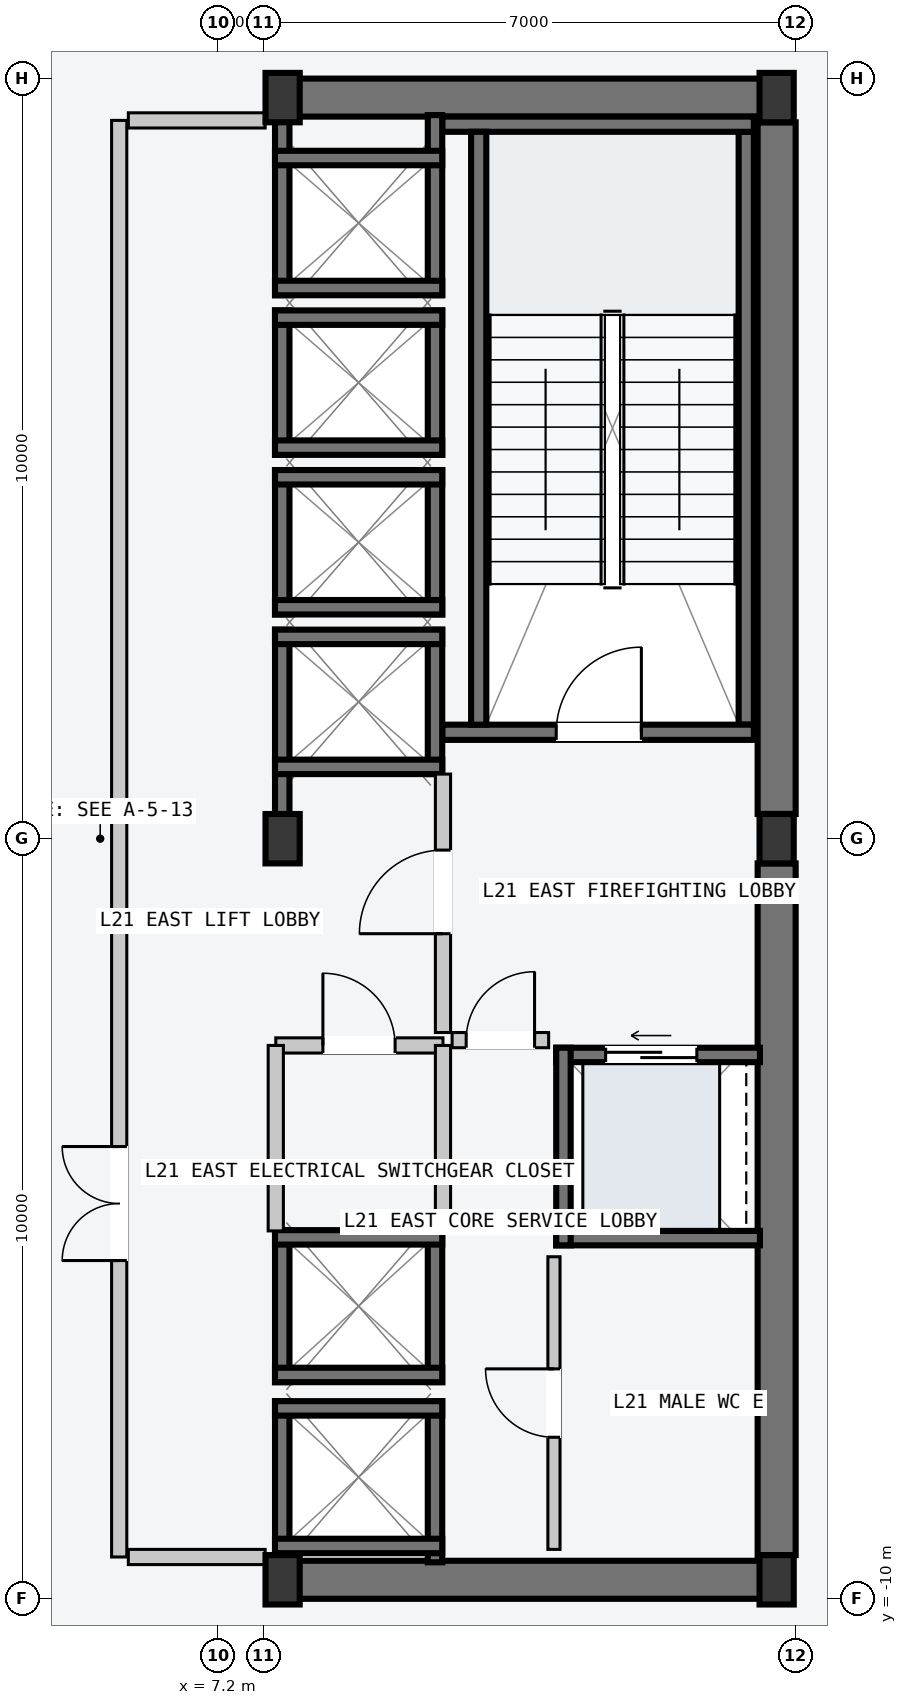
"""IFC4 building model, lengths in metres.
Left out: names, types, materials, properties, quantities, classifications, styles, units other than length and angle.
Written with IfcOpenShell. Run it as: python <this file> out.ifc"""

import sys

from ifc_helpers import new_model, si_unit, direction, frame, frame_2d, origin, origin_2d, place, context, subcontext, project, spatial, rectangle, i_section, extrude, element, fill, save


model = new_model("IFC4")
c1 = context("Model", 3, precision=1e-05, world=origin(), true_north=direction((0.0, 1.0)))
c2 = subcontext(c1, "Body", "Model", "MODEL_VIEW")
j1 = project(units=[si_unit("LENGTHUNIT", "METRE"), si_unit("PLANEANGLEUNIT", "RADIAN")], contexts=[c1])
p1 = place(None, origin())
s1 = spatial("IfcSite", under=j1, at=p1, CompositionType="ELEMENT")
p2 = place(p1, origin())
s2 = spatial("IfcBuilding", under=s1, at=p2, CompositionType="ELEMENT")
p3 = place(p2, frame((0.0, 0.0, 82.8)))
s3 = spatial("IfcBuildingStorey", under=s2, at=p3, CompositionType="ELEMENT", Elevation=82.8)
for number, where, z_axis, x_axis in (
    (1, (8.07, -9.75, -0.2), (0.0, 0.0, 1.0), (1.0, 0.0, 0.0)),
    (2, (8.07, 9.75, -0.2), (0.0, 0.0, 1.0), (1.0, 0.0, 0.0)),
):
    element("IfcWall", number, at=place(p3, frame(where, z_axis=z_axis, x_axis=x_axis)), inside=s3, PredefinedType="SHEAR", context=c2, shape_type="SweptSolid", body=[
        extrude(rectangle(XDim=6.46, YDim=0.5, at=frame_2d((3.23, 0.0))), origin(), (0.0, 0.0, 1.0), 4.5),
    ])
for number, where, z_axis, x_axis in (
    (3, (14.55, -9.425, -0.2), (0.0, 0.0, 1.0), (0.0, 1.0, 0.0)),
    (4, (14.55, 0.325, -0.2), (0.0, 0.0, 1.0), (0.0, 1.0, 0.0)),
):
    element("IfcWall", number, at=place(p3, frame(where, z_axis=z_axis, x_axis=x_axis)), inside=s3, PredefinedType="SHEAR", context=c2, shape_type="SweptSolid", body=[
        extrude(rectangle(XDim=9.1, YDim=0.5, at=frame_2d((4.55, 0.0))), origin(), (0.0, 0.0, 1.0), 4.5),
    ])
p4 = place(p3, frame((14.15, 1.5, -0.2), z_axis=(0.0, 0.0, 1.0), x_axis=(0.0, 1.0, 0.0)))
e5 = element("IfcWall", 5, at=p4, inside=s3, PredefinedType="SOLIDWALL", context=c2, shape_type="SweptSolid", body=[
    extrude(rectangle(XDim=7.8, YDim=0.2, at=frame_2d((3.9, 0.0))), origin(), (0.0, 0.0, 1.0), 4.5),
])
p5 = place(p3, frame((10.15, 1.4, -0.2), z_axis=(0.0, 0.0, 1.0), x_axis=(1.0, 0.0, 0.0)))
e6 = element("IfcWall", 6, at=p5, inside=s3, PredefinedType="SOLIDWALL", context=c2, shape_type="SweptSolid", body=[
    extrude(rectangle(XDim=4.1, YDim=0.2, at=frame_2d((2.05, 0.0))), origin(), (0.0, 0.0, 1.0), 4.5),
])
p6 = place(p5, frame((1.5, 0.0, 0.2)))
e7 = element("IfcOpeningElement", 7, at=p6, cuts=e6, PredefinedType="OPENING", context=c2, shape_type="SweptSolid", body=[
    extrude(rectangle(XDim=1.12, YDim=2.18, at=frame_2d((0.56, 1.09))), frame((0.0, 0.11, 0.0), z_axis=(0.0, -1.0, 0.0), x_axis=(1.0, 0.0, 0.0)), (0.0, 0.0, 1.0), 0.22),
])
p7 = place(p3, frame((10.15, 9.4, -0.2), z_axis=(0.0, 0.0, 1.0), x_axis=(1.0, 0.0, 0.0)))
e8 = element("IfcWall", 8, at=p7, inside=s3, PredefinedType="SOLIDWALL", context=c2, shape_type="SweptSolid", body=[
    extrude(rectangle(XDim=4.1, YDim=0.2, at=frame_2d((2.05, 0.0))), origin(), (0.0, 0.0, 1.0), 4.5),
])
p8 = place(p3, frame((10.63, 1.5, -0.2), z_axis=(0.0, 0.0, 1.0), x_axis=(0.0, 1.0, 0.0)))
e9 = element("IfcWall", 9, at=p8, inside=s3, PredefinedType="SOLIDWALL", context=c2, shape_type="SweptSolid", body=[
    extrude(rectangle(XDim=7.8, YDim=0.2, at=frame_2d((3.9, 0.0))), origin(), (0.0, 0.0, 1.0), 4.5),
])
for number, where, z_axis, x_axis in (
    (10, (8.05, -9.75, 0.0), (0.0, 0.0, 1.0), (1.0, 0.0, 0.0)),
    (11, (8.05, 0.0, 0.0), (0.0, 0.0, 1.0), (1.0, 0.0, 0.0)),
    (12, (8.05, 9.75, 0.0), (0.0, 0.0, 1.0), (1.0, 0.0, 0.0)),
    (13, (14.55, -9.75, 0.0), (0.0, 0.0, 1.0), (1.0, 0.0, 0.0)),
    (14, (14.55, 0.0, 0.0), (0.0, 0.0, 1.0), (1.0, 0.0, 0.0)),
    (15, (14.55, 9.75, 0.0), (0.0, 0.0, 1.0), (1.0, 0.0, 0.0)),
):
    element("IfcColumn", number, at=place(p3, frame(where, z_axis=z_axis, x_axis=x_axis)), inside=s3, PredefinedType="COLUMN", context=c2, shape_type="SweptSolid", body=[
        extrude(i_section(OverallWidth=0.45, OverallDepth=0.65, WebThickness=0.025, FlangeThickness=0.04, at=origin_2d()), origin(), (0.0, 0.0, 1.0), 4.5),
    ])
p9 = place(p3, frame((8.045, 0.21, -0.2), z_axis=(0.0, 0.0, 1.0), x_axis=(0.0, 1.0, 0.0)))
e16 = element("IfcWall", 16, at=p9, inside=s3, PredefinedType="SOLIDWALL", context=c2, shape_type="SweptSolid", body=[
    extrude(rectangle(XDim=2.54, YDim=0.19, at=frame_2d((1.27, 0.0))), origin(), (0.0, 0.0, 1.0), 4.5),
])
p10 = place(p3, frame((10.055, 0.85, -0.2), z_axis=(0.0, 0.0, 1.0), x_axis=(0.0, 1.0, 0.0)))
e17 = element("IfcWall", 17, at=p10, inside=s3, PredefinedType="SOLIDWALL", context=c2, shape_type="SweptSolid", body=[
    extrude(rectangle(XDim=1.9, YDim=0.19, at=frame_2d((0.95, 0.0))), origin(), (0.0, 0.0, 1.0), 4.5),
])
for number, where, z_axis, x_axis in (
    (18, (7.95, 2.655, -0.2), (0.0, 0.0, 1.0), (1.0, 0.0, 0.0)),
    (19, (7.95, 0.945, -0.2), (0.0, 0.0, 1.0), (1.0, 0.0, 0.0)),
):
    element("IfcWall", number, at=place(p3, frame(where, z_axis=z_axis, x_axis=x_axis)), inside=s3, PredefinedType="SOLIDWALL", context=c2, shape_type="SweptSolid", body=[
        extrude(rectangle(XDim=2.2, YDim=0.19, at=frame_2d((1.1, 0.0))), origin(), (0.0, 0.0, 1.0), 4.5),
    ])
for number, where, z_axis, x_axis in (
    (20, (8.045, 2.95, -0.2), (0.0, 0.0, 1.0), (0.0, 1.0, 0.0)),
    (21, (10.055, 2.95, -0.2), (0.0, 0.0, 1.0), (0.0, 1.0, 0.0)),
):
    element("IfcWall", number, at=place(p3, frame(where, z_axis=z_axis, x_axis=x_axis)), inside=s3, PredefinedType="SOLIDWALL", context=c2, shape_type="SweptSolid", body=[
        extrude(rectangle(XDim=1.9, YDim=0.19, at=frame_2d((0.95, 0.0))), origin(), (0.0, 0.0, 1.0), 4.5),
    ])
for number, where, z_axis, x_axis in (
    (22, (7.95, 4.755, -0.2), (0.0, 0.0, 1.0), (1.0, 0.0, 0.0)),
    (23, (7.95, 3.045, -0.2), (0.0, 0.0, 1.0), (1.0, 0.0, 0.0)),
):
    element("IfcWall", number, at=place(p3, frame(where, z_axis=z_axis, x_axis=x_axis)), inside=s3, PredefinedType="SOLIDWALL", context=c2, shape_type="SweptSolid", body=[
        extrude(rectangle(XDim=2.2, YDim=0.19, at=frame_2d((1.1, 0.0))), origin(), (0.0, 0.0, 1.0), 4.5),
    ])
for number, where, z_axis, x_axis in (
    (24, (8.045, 5.05, -0.2), (0.0, 0.0, 1.0), (0.0, 1.0, 0.0)),
    (25, (10.055, 5.05, -0.2), (0.0, 0.0, 1.0), (0.0, 1.0, 0.0)),
):
    element("IfcWall", number, at=place(p3, frame(where, z_axis=z_axis, x_axis=x_axis)), inside=s3, PredefinedType="SOLIDWALL", context=c2, shape_type="SweptSolid", body=[
        extrude(rectangle(XDim=1.9, YDim=0.19, at=frame_2d((0.95, 0.0))), origin(), (0.0, 0.0, 1.0), 4.5),
    ])
for number, where, z_axis, x_axis in (
    (26, (7.95, 6.855, -0.2), (0.0, 0.0, 1.0), (1.0, 0.0, 0.0)),
    (27, (7.95, 5.145, -0.2), (0.0, 0.0, 1.0), (1.0, 0.0, 0.0)),
):
    element("IfcWall", number, at=place(p3, frame(where, z_axis=z_axis, x_axis=x_axis)), inside=s3, PredefinedType="SOLIDWALL", context=c2, shape_type="SweptSolid", body=[
        extrude(rectangle(XDim=2.2, YDim=0.19, at=frame_2d((1.1, 0.0))), origin(), (0.0, 0.0, 1.0), 4.5),
    ])
for number, where, z_axis, x_axis in (
    (28, (8.045, 7.15, -0.2), (0.0, 0.0, 1.0), (0.0, 1.0, 0.0)),
    (29, (10.055, 7.15, -0.2), (0.0, 0.0, 1.0), (0.0, 1.0, 0.0)),
):
    element("IfcWall", number, at=place(p3, frame(where, z_axis=z_axis, x_axis=x_axis)), inside=s3, PredefinedType="SOLIDWALL", context=c2, shape_type="SweptSolid", body=[
        extrude(rectangle(XDim=2.37, YDim=0.19, at=frame_2d((1.185, 0.0))), origin(), (0.0, 0.0, 1.0), 4.5),
    ])
for number, where, z_axis, x_axis in (
    (30, (7.95, 8.955, -0.2), (0.0, 0.0, 1.0), (1.0, 0.0, 0.0)),
    (31, (7.95, 7.245, -0.2), (0.0, 0.0, 1.0), (1.0, 0.0, 0.0)),
):
    element("IfcWall", number, at=place(p3, frame(where, z_axis=z_axis, x_axis=x_axis)), inside=s3, PredefinedType="SOLIDWALL", context=c2, shape_type="SweptSolid", body=[
        extrude(rectangle(XDim=2.2, YDim=0.19, at=frame_2d((1.1, 0.0))), origin(), (0.0, 0.0, 1.0), 4.5),
    ])
for number, where, z_axis, x_axis in (
    (32, (8.045, -9.52, -0.2), (0.0, 0.0, 1.0), (0.0, 1.0, 0.0)),
    (33, (10.055, -9.52, -0.2), (0.0, 0.0, 1.0), (0.0, 1.0, 0.0)),
):
    element("IfcWall", number, at=place(p3, frame(where, z_axis=z_axis, x_axis=x_axis)), inside=s3, PredefinedType="SOLIDWALL", context=c2, shape_type="SweptSolid", body=[
        extrude(rectangle(XDim=2.12, YDim=0.19, at=frame_2d((1.06, 0.0))), origin(), (0.0, 0.0, 1.0), 4.5),
    ])
for number, where, z_axis, x_axis in (
    (34, (7.95, -7.495, -0.2), (0.0, 0.0, 1.0), (1.0, 0.0, 0.0)),
    (35, (7.95, -9.305, -0.2), (0.0, 0.0, 1.0), (1.0, 0.0, 0.0)),
):
    element("IfcWall", number, at=place(p3, frame(where, z_axis=z_axis, x_axis=x_axis)), inside=s3, PredefinedType="SOLIDWALL", context=c2, shape_type="SweptSolid", body=[
        extrude(rectangle(XDim=2.2, YDim=0.19, at=frame_2d((1.1, 0.0))), origin(), (0.0, 0.0, 1.0), 4.5),
    ])
for number, where, z_axis, x_axis in (
    (36, (8.045, -7.15, -0.2), (0.0, 0.0, 1.0), (0.0, 1.0, 0.0)),
    (37, (10.055, -7.15, -0.2), (0.0, 0.0, 1.0), (0.0, 1.0, 0.0)),
):
    element("IfcWall", number, at=place(p3, frame(where, z_axis=z_axis, x_axis=x_axis)), inside=s3, PredefinedType="SOLIDWALL", context=c2, shape_type="SweptSolid", body=[
        extrude(rectangle(XDim=2.0, YDim=0.19, at=frame_2d((1.0, 0.0))), origin(), (0.0, 0.0, 1.0), 4.5),
    ])
for number, where, z_axis, x_axis in (
    (38, (7.95, -5.245, -0.2), (0.0, 0.0, 1.0), (1.0, 0.0, 0.0)),
    (39, (7.95, -7.055, -0.2), (0.0, 0.0, 1.0), (1.0, 0.0, 0.0)),
):
    element("IfcWall", number, at=place(p3, frame(where, z_axis=z_axis, x_axis=x_axis)), inside=s3, PredefinedType="SOLIDWALL", context=c2, shape_type="SweptSolid", body=[
        extrude(rectangle(XDim=2.2, YDim=0.19, at=frame_2d((1.1, 0.0))), origin(), (0.0, 0.0, 1.0), 4.5),
    ])
p11 = place(p3, frame((11.65, -2.845, -0.2), z_axis=(0.0, 0.0, 1.0), x_axis=(1.0, 0.0, 0.0)))
e40 = element("IfcWall", 40, at=p11, inside=s3, PredefinedType="SOLIDWALL", context=c2, shape_type="SweptSolid", body=[
    extrude(rectangle(XDim=2.68, YDim=0.19, at=frame_2d((1.34, 0.0))), origin(), (0.0, 0.0, 1.0), 4.5),
])
p12 = place(p11, frame((0.65, 0.0, 0.2)))
e41 = element("IfcOpeningElement", 41, at=p12, cuts=e40, PredefinedType="OPENING", context=c2, shape_type="SweptSolid", body=[
    extrude(rectangle(XDim=1.2, YDim=2.2, at=frame_2d((0.6, 1.1))), frame((0.0, 0.105, 0.0), z_axis=(0.0, -1.0, 0.0), x_axis=(1.0, 0.0, 0.0)), (0.0, 0.0, 1.0), 0.21),
])
p13 = place(p3, frame((11.65, -5.255, -0.2), z_axis=(0.0, 0.0, 1.0), x_axis=(1.0, 0.0, 0.0)))
e42 = element("IfcWall", 42, at=p13, inside=s3, PredefinedType="SOLIDWALL", context=c2, shape_type="SweptSolid", body=[
    extrude(rectangle(XDim=2.68, YDim=0.19, at=frame_2d((1.34, 0.0))), origin(), (0.0, 0.0, 1.0), 4.5),
])
p14 = place(p3, frame((11.745, -5.35, -0.2), z_axis=(0.0, 0.0, 1.0), x_axis=(0.0, 1.0, 0.0)))
e43 = element("IfcWall", 43, at=p14, inside=s3, PredefinedType="SOLIDWALL", context=c2, shape_type="SweptSolid", body=[
    extrude(rectangle(XDim=2.6, YDim=0.19, at=frame_2d((1.3, 0.0))), origin(), (0.0, 0.0, 1.0), 4.5),
])
p15 = place(p3, frame((5.9, -9.45, 0.0), z_axis=(0.0, 0.0, 1.0), x_axis=(0.0, 1.0, 0.0)))
e44 = element("IfcWall", 44, at=p15, inside=s3, PredefinedType="PARTITIONING", context=c2, shape_type="SweptSolid", body=[
    extrude(rectangle(XDim=18.9, YDim=0.2, at=frame_2d((9.45, 0.0))), origin(), (0.0, 0.0, 1.0), 4.3),
])
p16 = place(p15, frame((3.9, 0.0, 0.0)))
e45 = element("IfcOpeningElement", 45, at=p16, cuts=e44, PredefinedType="OPENING", context=c2, shape_type="SweptSolid", body=[
    extrude(rectangle(XDim=1.5, YDim=2.2, at=frame_2d((0.75, 1.1))), frame((0.0, 0.11, 0.0), z_axis=(0.0, -1.0, 0.0), x_axis=(1.0, 0.0, 0.0)), (0.0, 0.0, 1.0), 0.22),
])
for number, where, z_axis, x_axis in (
    (46, (6.02, -9.45, 0.0), (0.0, 0.0, 1.0), (1.0, 0.0, 0.0)),
    (47, (6.02, 9.45, 0.0), (0.0, 0.0, 1.0), (1.0, 0.0, 0.0)),
):
    element("IfcWall", number, at=place(p3, frame(where, z_axis=z_axis, x_axis=x_axis)), inside=s3, PredefinedType="PARTITIONING", context=c2, shape_type="SweptSolid", body=[
        extrude(rectangle(XDim=1.8, YDim=0.2, at=frame_2d((0.9, 0.0))), origin(), (0.0, 0.0, 1.0), 2.64),
    ])
p17 = place(p3, frame((10.16, -2.55, 0.0), z_axis=(0.0, 0.0, 1.0), x_axis=(0.0, 1.0, 0.0)))
e48 = element("IfcWall", 48, at=p17, inside=s3, PredefinedType="PARTITIONING", context=c2, shape_type="SweptSolid", body=[
    extrude(rectangle(XDim=3.4, YDim=0.2, at=frame_2d((1.7, 0.0))), origin(), (0.0, 0.0, 1.0), 4.3),
])
p18 = place(p17, frame((1.3, 0.0, 0.0)))
e49 = element("IfcOpeningElement", 49, at=p18, cuts=e48, PredefinedType="OPENING", context=c2, shape_type="SweptSolid", body=[
    extrude(rectangle(XDim=1.1, YDim=2.15, at=frame_2d((0.55, 1.075))), frame((0.0, 0.11, 0.0), z_axis=(0.0, -1.0, 0.0), x_axis=(1.0, 0.0, 0.0)), (0.0, 0.0, 1.0), 0.22),
])
p19 = place(p3, frame((10.28, -2.65, 0.0), z_axis=(0.0, 0.0, 1.0), x_axis=(1.0, 0.0, 0.0)))
e50 = element("IfcWall", 50, at=p19, inside=s3, PredefinedType="PARTITIONING", context=c2, shape_type="SweptSolid", body=[
    extrude(rectangle(XDim=1.27, YDim=0.2, at=frame_2d((0.635, 0.0))), origin(), (0.0, 0.0, 1.0), 4.3),
])
p20 = place(p19, frame((0.185, 0.0, 0.0)))
e51 = element("IfcOpeningElement", 51, at=p20, cuts=e50, PredefinedType="OPENING", context=c2, shape_type="SweptSolid", body=[
    extrude(rectangle(XDim=0.9, YDim=2.15, at=frame_2d((0.45, 1.075))), frame((0.0, 0.11, 0.0), z_axis=(0.0, -1.0, 0.0), x_axis=(1.0, 0.0, 0.0)), (0.0, 0.0, 1.0), 0.22),
])
p21 = place(p3, frame((7.96, -2.72, 0.0), z_axis=(0.0, 0.0, 1.0), x_axis=(1.0, 0.0, 0.0)))
e52 = element("IfcWall", 52, at=p21, inside=s3, PredefinedType="PARTITIONING", context=c2, shape_type="SweptSolid", body=[
    extrude(rectangle(XDim=2.2, YDim=0.2, at=frame_2d((1.1, 0.0))), origin(), (0.0, 0.0, 1.0), 4.3),
])
p22 = place(p21, frame((0.62, 0.0, 0.0)))
e53 = element("IfcOpeningElement", 53, at=p22, cuts=e52, PredefinedType="OPENING", context=c2, shape_type="SweptSolid", body=[
    extrude(rectangle(XDim=0.95, YDim=2.1, at=frame_2d((0.475, 1.05))), frame((0.0, 0.11, 0.0), z_axis=(0.0, -1.0, 0.0), x_axis=(1.0, 0.0, 0.0)), (0.0, 0.0, 1.0), 0.22),
])
for number, where, z_axis, x_axis in (
    (54, (7.96, -5.16, 0.0), (0.0, 0.0, 1.0), (0.0, 1.0, 0.0)),
    (55, (10.16, -5.16, 0.0), (0.0, 0.0, 1.0), (0.0, 1.0, 0.0)),
):
    element("IfcWall", number, at=place(p3, frame(where, z_axis=z_axis, x_axis=x_axis)), inside=s3, PredefinedType="PARTITIONING", context=c2, shape_type="SweptSolid", body=[
        extrude(rectangle(XDim=2.44, YDim=0.2, at=frame_2d((1.22, 0.0))), origin(), (0.0, 0.0, 1.0), 4.3),
    ])
p23 = place(p3, frame((11.62, -9.35, 0.0), z_axis=(0.0, 0.0, 1.0), x_axis=(0.0, 1.0, 0.0)))
e56 = element("IfcWall", 56, at=p23, inside=s3, PredefinedType="PARTITIONING", context=c2, shape_type="SweptSolid", body=[
    extrude(rectangle(XDim=3.85, YDim=0.16, at=frame_2d((1.925, 0.0))), origin(), (0.0, 0.0, 1.0), 4.3),
])
p24 = place(p23, frame((1.475, 0.0, 0.0)))
e57 = element("IfcOpeningElement", 57, at=p24, cuts=e56, PredefinedType="OPENING", context=c2, shape_type="SweptSolid", body=[
    extrude(rectangle(XDim=0.9, YDim=2.15, at=frame_2d((0.45, 1.075))), frame((0.0, 0.09, 0.0), z_axis=(0.0, -1.0, 0.0), x_axis=(1.0, 0.0, 0.0)), (0.0, 0.0, 1.0), 0.18),
])
p25 = place(p6, origin())
e58 = element("IfcDoor", 58, at=p25, inside=s3, OperationType="SINGLE_SWING_RIGHT", PredefinedType="DOOR", context=c2, shape_type="SweptSolid", body=[
    extrude(rectangle(XDim=1.12, YDim=2.18, at=frame_2d((0.56, 1.09))), frame((0.0, 0.025, 0.0), z_axis=(0.0, -1.0, 0.0), x_axis=(1.0, 0.0, 0.0)), (0.0, 0.0, 1.0), 0.05),
])
fill(e7, e58)
p26 = place(p12, origin())
e59 = element("IfcDoor", 59, at=p26, inside=s3, OperationType="SLIDING_TO_LEFT", PredefinedType="DOOR", context=c2, shape_type="SweptSolid", body=[
    extrude(rectangle(XDim=1.2, YDim=2.2, at=frame_2d((0.6, 1.1))), frame((0.0, 0.025, 0.0), z_axis=(0.0, -1.0, 0.0), x_axis=(1.0, 0.0, 0.0)), (0.0, 0.0, 1.0), 0.05),
])
fill(e41, e59)
p27 = place(p16, origin())
e60 = element("IfcDoor", 60, at=p27, inside=s3, OperationType="DOUBLE_DOOR_SINGLE_SWING", PredefinedType="DOOR", context=c2, shape_type="SweptSolid", body=[
    extrude(rectangle(XDim=1.5, YDim=2.2, at=frame_2d((0.75, 1.1))), frame((0.0, 0.025, 0.0), z_axis=(0.0, -1.0, 0.0), x_axis=(1.0, 0.0, 0.0)), (0.0, 0.0, 1.0), 0.05),
])
fill(e45, e60)
p28 = place(p18, origin())
e61 = element("IfcDoor", 61, at=p28, inside=s3, OperationType="SINGLE_SWING_LEFT", PredefinedType="DOOR", context=c2, shape_type="SweptSolid", body=[
    extrude(rectangle(XDim=1.1, YDim=2.15, at=frame_2d((0.55, 1.075))), frame((0.0, 0.025, 0.0), z_axis=(0.0, -1.0, 0.0), x_axis=(1.0, 0.0, 0.0)), (0.0, 0.0, 1.0), 0.05),
])
fill(e49, e61)
p29 = place(p20, origin())
e62 = element("IfcDoor", 62, at=p29, inside=s3, OperationType="SINGLE_SWING_RIGHT", PredefinedType="DOOR", context=c2, shape_type="SweptSolid", body=[
    extrude(rectangle(XDim=0.9, YDim=2.15, at=frame_2d((0.45, 1.075))), frame((0.0, 0.025, 0.0), z_axis=(0.0, -1.0, 0.0), x_axis=(1.0, 0.0, 0.0)), (0.0, 0.0, 1.0), 0.05),
])
fill(e51, e62)
p30 = place(p22, origin())
e63 = element("IfcDoor", 63, at=p30, inside=s3, OperationType="SINGLE_SWING_LEFT", PredefinedType="DOOR", context=c2, shape_type="SweptSolid", body=[
    extrude(rectangle(XDim=0.95, YDim=2.1, at=frame_2d((0.475, 1.05))), frame((0.0, 0.025, 0.0), z_axis=(0.0, -1.0, 0.0), x_axis=(1.0, 0.0, 0.0)), (0.0, 0.0, 1.0), 0.05),
])
fill(e53, e63)
p31 = place(p24, origin())
e64 = element("IfcDoor", 64, at=p31, inside=s3, OperationType="SINGLE_SWING_RIGHT", PredefinedType="DOOR", context=c2, shape_type="SweptSolid", body=[
    extrude(rectangle(XDim=0.9, YDim=2.15, at=frame_2d((0.45, 1.075))), frame((0.0, 0.025, 0.0), z_axis=(0.0, -1.0, 0.0), x_axis=(1.0, 0.0, 0.0)), (0.0, 0.0, 1.0), 0.05),
])
fill(e57, e64)
save(model, sys.argv[1])
